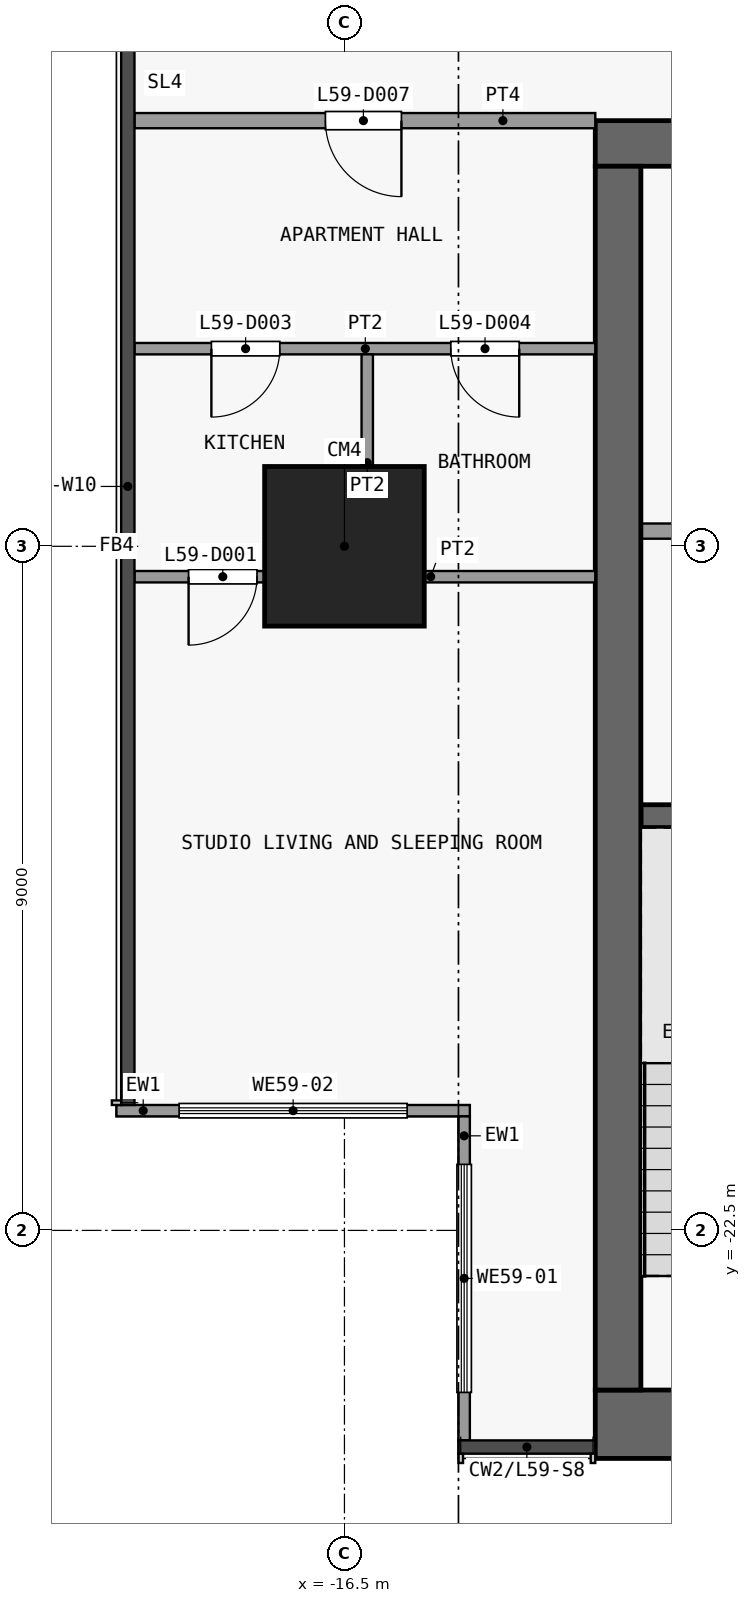
"""IFC4 building model, lengths in metres.
Left out: names, types, materials, properties, quantities, classifications, styles, units other than length and angle.
Written with IfcOpenShell. Run it as: python <this file> out.ifc"""

import sys

from ifc_helpers import new_model, si_unit, direction, frame, frame_2d, origin, origin_2d, place, context, subcontext, project, spatial, rectangle, extrude, element, fill, save


model = new_model("IFC4")
c1 = context("Model", 3, precision=1e-05, world=origin(), true_north=direction((0.0, 1.0)))
c2 = subcontext(c1, "Body", "Model", "MODEL_VIEW")
j1 = project(units=[si_unit("LENGTHUNIT", "METRE"), si_unit("PLANEANGLEUNIT", "RADIAN")], contexts=[c1])
p1 = place(None, origin())
s1 = spatial("IfcSite", under=j1, at=p1, CompositionType="ELEMENT")
p2 = place(p1, origin())
s2 = spatial("IfcBuilding", under=s1, at=p2, CompositionType="ELEMENT")
p3 = place(p2, frame((0.0, 0.0, 233.9)))
s3 = spatial("IfcBuildingStorey", under=s2, at=p3, CompositionType="ELEMENT", Elevation=233.9)
p4 = place(p3, frame((-16.5, -13.5, 0.0), z_axis=(0.0, 0.0, 1.0), x_axis=(1.0, 0.0, 0.0)))
e1 = element("IfcColumn", 1, at=p4, inside=s3, PredefinedType="COLUMN", context=c2, shape_type="SweptSolid", body=[
    extrude(rectangle(XDim=2.1, YDim=2.1, at=origin_2d()), origin(), (0.0, 0.0, 1.0), 3.6),
])
p5 = place(p3, frame((-13.2, -25.05, 0.0), z_axis=(0.0, 0.0, 1.0), x_axis=(1.0, 0.0, 0.0)))
e2 = element("IfcWall", 2, at=p5, inside=s3, PredefinedType="SHEAR", context=c2, shape_type="SweptSolid", body=[
    extrude(rectangle(XDim=26.4, YDim=0.9, at=frame_2d((13.2, 0.0))), origin(), (0.0, 0.0, 1.0), 3.3),
])
p6 = place(p3, frame((-13.2, -8.2, 0.0), z_axis=(0.0, 0.0, 1.0), x_axis=(1.0, 0.0, 0.0)))
e3 = element("IfcWall", 3, at=p6, inside=s3, PredefinedType="SHEAR", context=c2, shape_type="SweptSolid", body=[
    extrude(rectangle(XDim=26.4, YDim=0.6, at=frame_2d((13.2, 0.0))), origin(), (0.0, 0.0, 1.0), 3.3),
])
p7 = place(p6, frame((7.5, 0.0, 0.0)))
e4 = element("IfcOpeningElement", 4, at=p7, cuts=e3, PredefinedType="OPENING", context=c2, shape_type="SweptSolid", body=[
    extrude(rectangle(XDim=1.8, YDim=2.1, at=frame_2d((0.9, 1.05))), frame((0.0, 0.31, 0.0), z_axis=(0.0, -1.0, 0.0), x_axis=(1.0, 0.0, 0.0)), (0.0, 0.0, 1.0), 0.62),
])
p8 = place(p6, frame((17.1, 0.0, 0.0)))
e5 = element("IfcOpeningElement", 5, at=p8, cuts=e3, PredefinedType="OPENING", context=c2, shape_type="SweptSolid", body=[
    extrude(rectangle(XDim=1.8, YDim=2.1, at=frame_2d((0.9, 1.05))), frame((0.0, 0.31, 0.0), z_axis=(0.0, -1.0, 0.0), x_axis=(1.0, 0.0, 0.0)), (0.0, 0.0, 1.0), 0.62),
])
p9 = place(p6, frame((2.425, 0.0, 0.0)))
e6 = element("IfcOpeningElement", 6, at=p9, cuts=e3, PredefinedType="OPENING", context=c2, shape_type="SweptSolid", body=[
    extrude(rectangle(XDim=0.9, YDim=2.1, at=frame_2d((0.45, 1.05))), frame((0.0, 0.31, 0.0), z_axis=(0.0, -1.0, 0.0), x_axis=(1.0, 0.0, 0.0)), (0.0, 0.0, 1.0), 0.62),
])
p10 = place(p6, frame((23.075, 0.0, 0.0)))
e7 = element("IfcOpeningElement", 7, at=p10, cuts=e3, PredefinedType="OPENING", context=c2, shape_type="SweptSolid", body=[
    extrude(rectangle(XDim=0.9, YDim=2.1, at=frame_2d((0.45, 1.05))), frame((0.0, 0.31, 0.0), z_axis=(0.0, -1.0, 0.0), x_axis=(1.0, 0.0, 0.0)), (0.0, 0.0, 1.0), 0.62),
])
p11 = place(p3, frame((-12.9, -24.6, 0.0), z_axis=(0.0, 0.0, 1.0), x_axis=(0.0, 1.0, 0.0)))
e8 = element("IfcWall", 8, at=p11, inside=s3, PredefinedType="SHEAR", context=c2, shape_type="SweptSolid", body=[
    extrude(rectangle(XDim=16.1, YDim=0.6, at=frame_2d((8.05, 0.0))), origin(), (0.0, 0.0, 1.0), 3.3),
])
p12 = place(p3, frame((-12.6, -17.05, 0.0), z_axis=(0.0, 0.0, 1.0), x_axis=(1.0, 0.0, 0.0)))
e9 = element("IfcWall", 9, at=p12, inside=s3, PredefinedType="SHEAR", context=c2, shape_type="SweptSolid", body=[
    extrude(rectangle(XDim=3.1, YDim=0.3, at=frame_2d((1.55, 0.0))), origin(), (0.0, 0.0, 1.0), 3.3),
])
p13 = place(p3, frame((-12.6, -13.3, 0.0), z_axis=(0.0, 0.0, 1.0), x_axis=(1.0, 0.0, 0.0)))
e10 = element("IfcWall", 10, at=p13, inside=s3, PredefinedType="PARTITIONING", context=c2, shape_type="SweptSolid", body=[
    extrude(rectangle(XDim=1.45, YDim=0.2, at=frame_2d((0.725, 0.0))), origin(), (0.0, 0.0, 1.0), 3.3),
])
p14 = place(p3, frame((-14.925, -25.262, 0.0), z_axis=(0.0, 0.0, 1.0), x_axis=(0.0, 1.0, 0.0)))
e11 = element("IfcWall", 11, at=p14, inside=s3, PredefinedType="SOLIDWALL", context=c2, shape_type="SweptSolid", body=[
    extrude(rectangle(XDim=4.262, YDim=0.15, at=frame_2d((2.131, 0.0))), origin(), (0.0, 0.0, 1.0), 3.3),
])
p15 = place(p14, frame((0.631, 0.0, 0.9)))
e12 = element("IfcOpeningElement", 12, at=p15, cuts=e11, PredefinedType="OPENING", context=c2, shape_type="SweptSolid", body=[
    extrude(rectangle(XDim=3.0, YDim=2.4, at=frame_2d((1.5, 1.2))), frame((0.0, 0.085, 0.0), z_axis=(0.0, -1.0, 0.0), x_axis=(1.0, 0.0, 0.0)), (0.0, 0.0, 1.0), 0.17),
])
p16 = place(p3, frame((-14.85, -20.925, 0.0), z_axis=(0.0, 0.0, 1.0), x_axis=(-1.0, 0.0, 0.0)))
e13 = element("IfcWall", 13, at=p16, inside=s3, PredefinedType="SOLIDWALL", context=c2, shape_type="SweptSolid", body=[
    extrude(rectangle(XDim=4.65, YDim=0.15, at=frame_2d((2.325, 0.0))), origin(), (0.0, 0.0, 1.0), 3.3),
])
p17 = place(p16, frame((0.825, 0.0, 0.9)))
e14 = element("IfcOpeningElement", 14, at=p17, cuts=e13, PredefinedType="OPENING", context=c2, shape_type="SweptSolid", body=[
    extrude(rectangle(XDim=3.0, YDim=2.4, at=frame_2d((1.5, 1.2))), frame((0.0, 0.085, 0.0), z_axis=(0.0, -1.0, 0.0), x_axis=(1.0, 0.0, 0.0)), (0.0, 0.0, 1.0), 0.17),
])
p18 = place(p3, frame((-19.262, -13.9, 0.0), z_axis=(0.0, 0.0, 1.0), x_axis=(1.0, 0.0, 0.0)))
e15 = element("IfcWall", 15, at=p18, inside=s3, PredefinedType="PARTITIONING", context=c2, shape_type="SweptSolid", body=[
    extrude(rectangle(XDim=6.062, YDim=0.15, at=frame_2d((3.031, 0.0))), origin(), (0.0, 0.0, 1.0), 3.3),
])
p19 = place(p18, frame((0.712, 0.0, 0.0)))
e16 = element("IfcOpeningElement", 16, at=p19, cuts=e15, PredefinedType="OPENING", context=c2, shape_type="SweptSolid", body=[
    extrude(rectangle(XDim=0.9, YDim=2.1, at=frame_2d((0.45, 1.05))), frame((0.0, 0.085, 0.0), z_axis=(0.0, -1.0, 0.0), x_axis=(1.0, 0.0, 0.0)), (0.0, 0.0, 1.0), 0.17),
])
p20 = place(p3, frame((-19.262, -10.9, 0.0), z_axis=(0.0, 0.0, 1.0), x_axis=(1.0, 0.0, 0.0)))
e17 = element("IfcWall", 17, at=p20, inside=s3, PredefinedType="PARTITIONING", context=c2, shape_type="SweptSolid", body=[
    extrude(rectangle(XDim=6.062, YDim=0.15, at=frame_2d((3.031, 0.0))), origin(), (0.0, 0.0, 1.0), 3.3),
])
p21 = place(p20, frame((1.012, 0.0, 0.0)))
e18 = element("IfcOpeningElement", 18, at=p21, cuts=e17, PredefinedType="OPENING", context=c2, shape_type="SweptSolid", body=[
    extrude(rectangle(XDim=0.9, YDim=2.1, at=frame_2d((0.45, 1.05))), frame((0.0, 0.085, 0.0), z_axis=(0.0, -1.0, 0.0), x_axis=(1.0, 0.0, 0.0)), (0.0, 0.0, 1.0), 0.17),
])
p22 = place(p20, frame((4.162, 0.0, 0.0)))
e19 = element("IfcOpeningElement", 19, at=p22, cuts=e17, PredefinedType="OPENING", context=c2, shape_type="SweptSolid", body=[
    extrude(rectangle(XDim=0.9, YDim=2.1, at=frame_2d((0.45, 1.05))), frame((0.0, 0.085, 0.0), z_axis=(0.0, -1.0, 0.0), x_axis=(1.0, 0.0, 0.0)), (0.0, 0.0, 1.0), 0.17),
])
p23 = place(p3, frame((-19.262, -7.9, 0.0), z_axis=(0.0, 0.0, 1.0), x_axis=(1.0, 0.0, 0.0)))
e20 = element("IfcWall", 20, at=p23, inside=s3, PredefinedType="PARTITIONING", context=c2, shape_type="SweptSolid", body=[
    extrude(rectangle(XDim=6.062, YDim=0.2, at=frame_2d((3.031, 0.0))), origin(), (0.0, 0.0, 1.0), 3.3),
])
p24 = place(p23, frame((2.512, 0.0, 0.0)))
e21 = element("IfcOpeningElement", 21, at=p24, cuts=e20, PredefinedType="OPENING", context=c2, shape_type="SweptSolid", body=[
    extrude(rectangle(XDim=1.0, YDim=2.1, at=frame_2d((0.5, 1.05))), frame((0.0, 0.11, 0.0), z_axis=(0.0, -1.0, 0.0), x_axis=(1.0, 0.0, 0.0)), (0.0, 0.0, 1.0), 0.22),
])
p25 = place(p3, frame((-16.2, -13.825, 0.0), z_axis=(0.0, 0.0, 1.0), x_axis=(0.0, 1.0, 0.0)))
e22 = element("IfcWall", 22, at=p25, inside=s3, PredefinedType="PARTITIONING", context=c2, shape_type="SweptSolid", body=[
    extrude(rectangle(XDim=2.85, YDim=0.15, at=frame_2d((1.425, 0.0))), origin(), (0.0, 0.0, 1.0), 3.3),
])
p26 = place(p15, origin())
e23 = element("IfcWindow", 23, at=p26, inside=s3, PartitioningType="SINGLE_PANEL", PredefinedType="WINDOW", context=c2, shape_type="SweptSolid", body=[
    extrude(rectangle(XDim=3.0, YDim=2.4, at=frame_2d((1.5, 1.2))), frame((0.0, 0.03, 0.0), z_axis=(0.0, -1.0, 0.0), x_axis=(1.0, 0.0, 0.0)), (0.0, 0.0, 1.0), 0.06),
])
fill(e12, e23)
p27 = place(p17, origin())
e24 = element("IfcWindow", 24, at=p27, inside=s3, PartitioningType="SINGLE_PANEL", PredefinedType="WINDOW", context=c2, shape_type="SweptSolid", body=[
    extrude(rectangle(XDim=3.0, YDim=2.4, at=frame_2d((1.5, 1.2))), frame((0.0, 0.03, 0.0), z_axis=(0.0, -1.0, 0.0), x_axis=(1.0, 0.0, 0.0)), (0.0, 0.0, 1.0), 0.06),
])
fill(e14, e24)
p28 = place(p19, origin())
e25 = element("IfcDoor", 25, at=p28, inside=s3, OperationType="SINGLE_SWING_LEFT", PredefinedType="DOOR", context=c2, shape_type="SweptSolid", body=[
    extrude(rectangle(XDim=0.9, YDim=2.1, at=frame_2d((0.45, 1.05))), frame((0.0, 0.025, 0.0), z_axis=(0.0, -1.0, 0.0), x_axis=(1.0, 0.0, 0.0)), (0.0, 0.0, 1.0), 0.05),
])
fill(e16, e25)
p29 = place(p21, origin())
e26 = element("IfcDoor", 26, at=p29, inside=s3, OperationType="SINGLE_SWING_LEFT", PredefinedType="DOOR", context=c2, shape_type="SweptSolid", body=[
    extrude(rectangle(XDim=0.9, YDim=2.1, at=frame_2d((0.45, 1.05))), frame((0.0, 0.025, 0.0), z_axis=(0.0, -1.0, 0.0), x_axis=(1.0, 0.0, 0.0)), (0.0, 0.0, 1.0), 0.05),
])
fill(e18, e26)
p30 = place(p22, origin())
e27 = element("IfcDoor", 27, at=p30, inside=s3, OperationType="SINGLE_SWING_RIGHT", PredefinedType="DOOR", context=c2, shape_type="SweptSolid", body=[
    extrude(rectangle(XDim=0.9, YDim=2.1, at=frame_2d((0.45, 1.05))), frame((0.0, 0.025, 0.0), z_axis=(0.0, -1.0, 0.0), x_axis=(1.0, 0.0, 0.0)), (0.0, 0.0, 1.0), 0.05),
])
fill(e19, e27)
p31 = place(p24, origin())
e28 = element("IfcDoor", 28, at=p31, inside=s3, OperationType="SINGLE_SWING_RIGHT", PredefinedType="DOOR", context=c2, shape_type="SweptSolid", body=[
    extrude(rectangle(XDim=1.0, YDim=2.1, at=frame_2d((0.5, 1.05))), frame((0.0, 0.025, 0.0), z_axis=(0.0, -1.0, 0.0), x_axis=(1.0, 0.0, 0.0)), (0.0, 0.0, 1.0), 0.05),
])
fill(e21, e28)
save(model, sys.argv[1])
